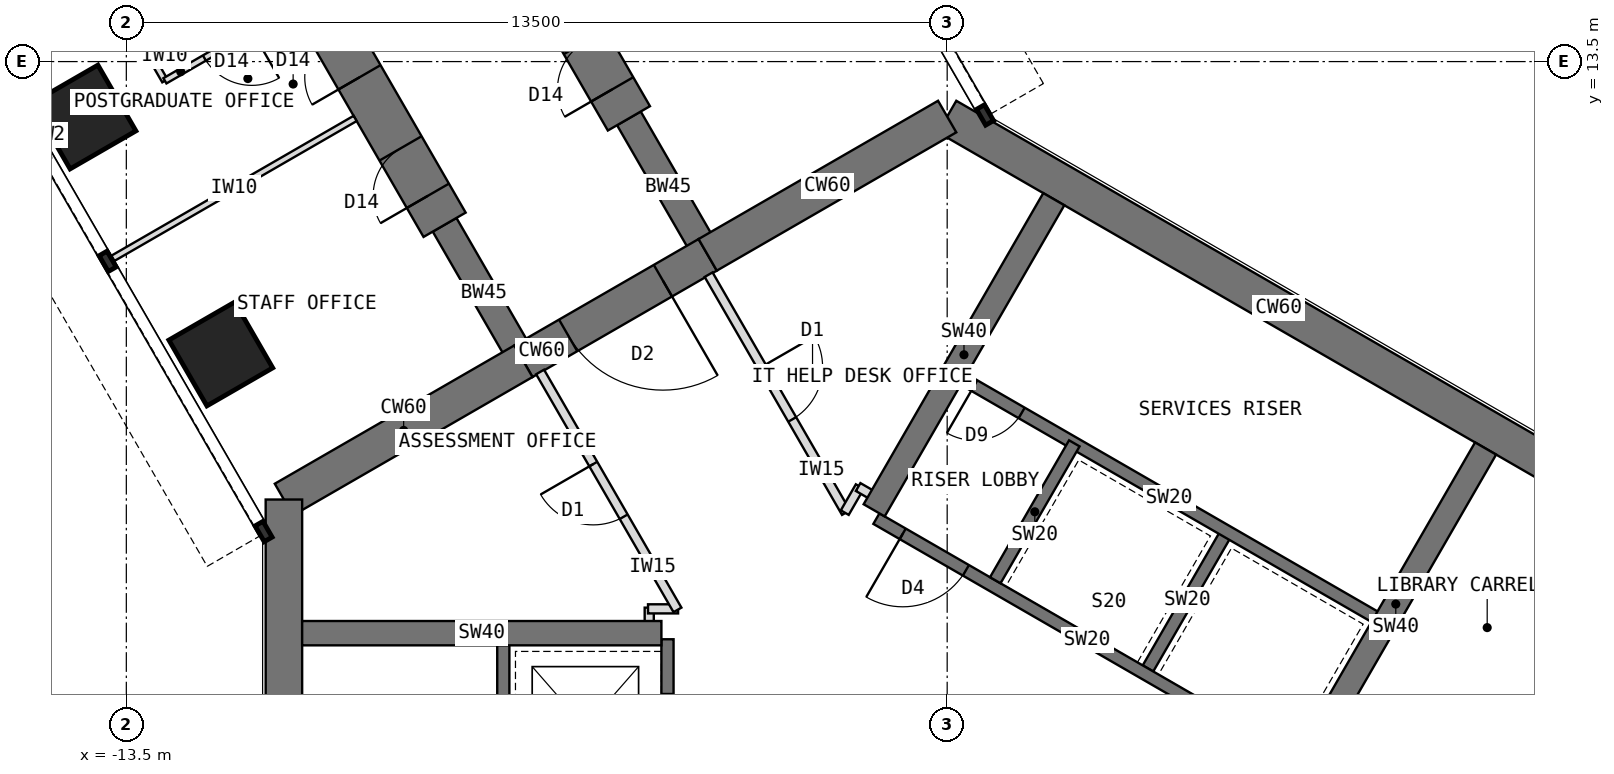
"""IFC4 building model, lengths in metres.
Left out: names, types, materials, properties, quantities, classifications, styles, units other than length and angle.
Written with IfcOpenShell. Run it as: python <this file> out.ifc"""

import sys

from ifc_helpers import new_model, si_unit, direction, frame, frame_2d, origin, origin_2d, place, context, subcontext, project, spatial, rectangle, extrude, element, fill, save


model = new_model("IFC4")
c1 = context("Model", 3, precision=1e-05, world=origin(), true_north=direction((0.0, 1.0)))
c2 = subcontext(c1, "Body", "Model", "MODEL_VIEW")
j1 = project(units=[si_unit("LENGTHUNIT", "METRE"), si_unit("PLANEANGLEUNIT", "RADIAN")], contexts=[c1])
p1 = place(None, origin())
s1 = spatial("IfcSite", under=j1, at=p1, CompositionType="ELEMENT")
p2 = place(p1, origin())
s2 = spatial("IfcBuilding", under=s1, at=p2, CompositionType="ELEMENT")
p3 = place(p2, frame((0.0, 0.0, 145.5)))
s3 = spatial("IfcBuildingStorey", under=s2, at=p3, CompositionType="ELEMENT", Elevation=145.5)
p4 = place(p3, frame((10.908, 6.298, 0.0), z_axis=(0.0, 0.0, 1.0), x_axis=(-0.866021940709, 0.500005998175, 0.0)))
e1 = element("IfcWall", 1, at=p4, inside=s3, PredefinedType="SHEAR", context=c2, shape_type="SweptSolid", body=[
    extrude(rectangle(XDim=12.596, YDim=0.6, at=frame_2d((6.298, 0.0))), origin(), (0.0, 0.0, 1.0), 4.0),
])
p5 = place(p3, frame((0.0, 12.596, 0.0), z_axis=(0.0, 0.0, 1.0), x_axis=(-0.866011268655, -0.500024481964, 0.0)))
e2 = element("IfcWall", 2, at=p5, inside=s3, PredefinedType="SHEAR", context=c2, shape_type="SweptSolid", body=[
    extrude(rectangle(XDim=4.548, YDim=0.6, at=frame_2d((2.274, 0.0))), origin(), (0.0, 0.0, 1.0), 4.0),
])
p6 = place(p3, frame((-3.939, 10.322, 0.0), z_axis=(0.0, 0.0, 1.0), x_axis=(-0.866019471182, -0.500010275428, 0.0)))
e3 = element("IfcWall", 3, at=p6, inside=s3, PredefinedType="SHEAR", context=c2, shape_type="SweptSolid", body=[
    extrude(rectangle(XDim=3.5, YDim=0.6, at=frame_2d((1.75, 0.0))), origin(), (0.0, 0.0, 1.0), 4.0),
])
p7 = place(p6, frame((0.85, 0.0, 0.0)))
e4 = element("IfcOpeningElement", 4, at=p7, cuts=e3, PredefinedType="OPENING", context=c2, shape_type="SweptSolid", body=[
    extrude(rectangle(XDim=1.8, YDim=2.1, at=frame_2d((0.9, 1.05))), frame((0.0, 0.31, 0.0), z_axis=(0.0, -1.0, 0.0), x_axis=(1.0, 0.0, 0.0)), (0.0, 0.0, 1.0), 0.62),
])
p8 = place(p3, frame((-6.97, 8.572, 0.0), z_axis=(0.0, 0.0, 1.0), x_axis=(-0.866034513004, -0.499984222037, 0.0)))
e5 = element("IfcWall", 5, at=p8, inside=s3, PredefinedType="SHEAR", context=c2, shape_type="SweptSolid", body=[
    extrude(rectangle(XDim=4.548, YDim=0.6, at=frame_2d((2.274, 0.0))), origin(), (0.0, 0.0, 1.0), 4.0),
])
p9 = place(p3, frame((-10.908, 6.298, 0.0), z_axis=(0.0, 0.0, 1.0), x_axis=(0.0, -1.0, 0.0)))
e6 = element("IfcWall", 6, at=p9, inside=s3, PredefinedType="SHEAR", context=c2, shape_type="SweptSolid", body=[
    extrude(rectangle(XDim=12.596, YDim=0.6, at=frame_2d((6.298, 0.0))), origin(), (0.0, 0.0, 1.0), 4.0),
])
p10 = place(p3, frame((-6.97, 8.572, 0.0), z_axis=(0.0, 0.0, 1.0), x_axis=(-0.499988811324, 0.866031863473, 0.0)))
e7 = element("IfcWall", 7, at=p10, inside=s3, PredefinedType="SHEAR", context=c2, shape_type="SweptSolid", body=[
    extrude(rectangle(XDim=2.592, YDim=0.45, at=frame_2d((1.296, 0.0))), origin(), (0.0, 0.0, 1.0), 4.0),
])
p11 = place(p3, frame((-8.266, 10.816, 0.0), z_axis=(0.0, 0.0, 1.0), x_axis=(-0.499996231654, 0.866027579429, 0.0)))
e8 = element("IfcWall", 8, at=p11, inside=s3, PredefinedType="SHEAR", context=c2, shape_type="SweptSolid", body=[
    extrude(rectangle(XDim=13.2, YDim=0.8, at=frame_2d((6.6, 0.0))), origin(), (0.0, 0.0, 1.0), 4.0),
])
p12 = place(p11, frame((0.55, 0.0, 0.0)))
e9 = element("IfcOpeningElement", 9, at=p12, cuts=e8, PredefinedType="OPENING", context=c2, shape_type="SweptSolid", body=[
    extrude(rectangle(XDim=0.9, YDim=2.1, at=frame_2d((0.45, 1.05))), frame((0.0, 0.41, 0.0), z_axis=(0.0, -1.0, 0.0), x_axis=(1.0, 0.0, 0.0)), (0.0, 0.0, 1.0), 0.82),
])
p13 = place(p11, frame((2.8, 0.0, 0.0)))
e10 = element("IfcOpeningElement", 10, at=p13, cuts=e8, PredefinedType="OPENING", context=c2, shape_type="SweptSolid", body=[
    extrude(rectangle(XDim=0.9, YDim=2.1, at=frame_2d((0.45, 1.05))), frame((0.0, 0.41, 0.0), z_axis=(0.0, -1.0, 0.0), x_axis=(1.0, 0.0, 0.0)), (0.0, 0.0, 1.0), 0.82),
])
p14 = place(p11, frame((7.3, 0.0, 0.0)))
e11 = element("IfcOpeningElement", 11, at=p14, cuts=e8, PredefinedType="OPENING", context=c2, shape_type="SweptSolid", body=[
    extrude(rectangle(XDim=0.9, YDim=2.1, at=frame_2d((0.45, 1.05))), frame((0.0, 0.41, 0.0), z_axis=(0.0, -1.0, 0.0), x_axis=(1.0, 0.0, 0.0)), (0.0, 0.0, 1.0), 0.82),
])
p15 = place(p3, frame((-3.939, 10.322, 0.0), z_axis=(0.0, 0.0, 1.0), x_axis=(-0.499918158782, 0.866072649678, 0.0)))
e12 = element("IfcWall", 12, at=p15, inside=s3, PredefinedType="SHEAR", context=c2, shape_type="SweptSolid", body=[
    extrude(rectangle(XDim=2.592, YDim=0.45, at=frame_2d((1.296, 0.0))), origin(), (0.0, 0.0, 1.0), 4.0),
])
p16 = place(p3, frame((-5.234, 12.566, 0.0), z_axis=(0.0, 0.0, 1.0), x_axis=(-0.500010103361, 0.866019570528, 0.0)))
e13 = element("IfcWall", 13, at=p16, inside=s3, PredefinedType="SHEAR", context=c2, shape_type="SweptSolid", body=[
    extrude(rectangle(XDim=13.2, YDim=0.8, at=frame_2d((6.6, 0.0))), origin(), (0.0, 0.0, 1.0), 4.0),
])
p17 = place(p16, frame((0.55, 0.0, 0.0)))
e14 = element("IfcOpeningElement", 14, at=p17, cuts=e13, PredefinedType="OPENING", context=c2, shape_type="SweptSolid", body=[
    extrude(rectangle(XDim=0.9, YDim=2.1, at=frame_2d((0.45, 1.05))), frame((0.0, 0.41, 0.0), z_axis=(0.0, -1.0, 0.0), x_axis=(1.0, 0.0, 0.0)), (0.0, 0.0, 1.0), 0.82),
])
p18 = place(p16, frame((2.8, 0.0, 0.0)))
e15 = element("IfcOpeningElement", 15, at=p18, cuts=e13, PredefinedType="OPENING", context=c2, shape_type="SweptSolid", body=[
    extrude(rectangle(XDim=0.9, YDim=2.1, at=frame_2d((0.45, 1.05))), frame((0.0, 0.41, 0.0), z_axis=(0.0, -1.0, 0.0), x_axis=(1.0, 0.0, 0.0)), (0.0, 0.0, 1.0), 0.82),
])
p19 = place(p16, frame((7.3, 0.0, 0.0)))
e16 = element("IfcOpeningElement", 16, at=p19, cuts=e13, PredefinedType="OPENING", context=c2, shape_type="SweptSolid", body=[
    extrude(rectangle(XDim=0.9, YDim=2.1, at=frame_2d((0.45, 1.05))), frame((0.0, 0.41, 0.0), z_axis=(0.0, -1.0, 0.0), x_axis=(1.0, 0.0, 0.0)), (0.0, 0.0, 1.0), 0.82),
])
for number, where, z_axis, x_axis in (
    (17, (-11.946, 8.691, 0.0), (0.0, 0.0, 1.0), (0.866, 0.5, 0.0)),
    (18, (-14.196, 12.588, 0.0), (0.0, 0.0, 1.0), (0.866, 0.5, 0.0)),
):
    element("IfcColumn", number, at=place(p3, frame(where, z_axis=z_axis, x_axis=x_axis)), inside=s3, PredefinedType="COLUMN", context=c2, shape_type="SweptSolid", body=[
        extrude(rectangle(XDim=1.25, YDim=1.25, at=origin_2d()), origin(), (0.0, 0.0, 1.0), 4.0),
    ])
p20 = place(p3, frame((5.764, 1.984, 0.0), z_axis=(0.0, 0.0, 1.0), x_axis=(-0.866026010844, 0.49999894854, 0.0)))
e19 = element("IfcWall", 19, at=p20, inside=s3, PredefinedType="SHEAR", context=c2, shape_type="SweptSolid", body=[
    extrude(rectangle(XDim=8.0, YDim=0.2, at=frame_2d((4.0, 0.0))), origin(), (0.0, 0.0, 1.0), 4.0),
])
p21 = place(p20, frame((6.3, 0.0, 0.0)))
e20 = element("IfcOpeningElement", 20, at=p21, cuts=e19, PredefinedType="OPENING", context=c2, shape_type="SweptSolid", body=[
    extrude(rectangle(XDim=1.2, YDim=2.1, at=frame_2d((0.6, 1.05))), frame((0.0, 0.11, 0.0), z_axis=(0.0, -1.0, 0.0), x_axis=(1.0, 0.0, 0.0)), (0.0, 0.0, 1.0), 0.22),
])
for number, where, z_axis, x_axis in (
    (21, (3.303, 3.52, 0.0), (0.0, 0.0, 1.0), (0.5, 0.866, 0.0)),
    (22, (0.791, 4.97, 0.0), (0.0, 0.0, 1.0), (0.5, 0.866, 0.0)),
):
    element("IfcWall", number, at=place(p3, frame(where, z_axis=z_axis, x_axis=x_axis)), inside=s3, PredefinedType="SHEAR", context=c2, shape_type="SweptSolid", body=[
        extrude(rectangle(XDim=2.6, YDim=0.2, at=frame_2d((1.3, 0.0))), origin(), (0.0, 0.0, 1.0), 4.0),
    ])
p22 = place(p3, frame((7.114, 4.322, 0.0), z_axis=(0.0, 0.0, 1.0), x_axis=(-0.866026010844, 0.49999894854, 0.0)))
e23 = element("IfcWall", 23, at=p22, inside=s3, PredefinedType="SHEAR", context=c2, shape_type="SweptSolid", body=[
    extrude(rectangle(XDim=8.0, YDim=0.2, at=frame_2d((4.0, 0.0))), origin(), (0.0, 0.0, 1.0), 4.0),
])
p23 = place(p22, frame((6.8, 0.0, 0.0)))
e24 = element("IfcOpeningElement", 24, at=p23, cuts=e23, PredefinedType="OPENING", context=c2, shape_type="SweptSolid", body=[
    extrude(rectangle(XDim=0.9, YDim=2.1, at=frame_2d((0.45, 1.05))), frame((0.0, 0.11, 0.0), z_axis=(0.0, -1.0, 0.0), x_axis=(1.0, 0.0, 0.0)), (0.0, 0.0, 1.0), 0.22),
])
p24 = place(p3, frame((-1.201, 6.12, 0.0), z_axis=(0.0, 0.0, 1.0), x_axis=(0.49999668571, 0.866027317282, 0.0)))
e25 = element("IfcWall", 25, at=p24, inside=s3, PredefinedType="SHEAR", context=c2, shape_type="SweptSolid", body=[
    extrude(rectangle(XDim=5.908, YDim=0.4, at=frame_2d((2.954, 0.0))), origin(), (0.0, 0.0, 1.0), 4.0),
])
p25 = place(p3, frame((5.901, 2.02, 0.0), z_axis=(0.0, 0.0, 1.0), x_axis=(0.500027676417, 0.866009424208, 0.0)))
e26 = element("IfcWall", 26, at=p25, inside=s3, PredefinedType="SHEAR", context=c2, shape_type="SweptSolid", body=[
    extrude(rectangle(XDim=5.908, YDim=0.4, at=frame_2d((2.954, 0.0))), origin(), (0.0, 0.0, 1.0), 4.0),
])
p26 = place(p3, frame((-4.6, 4.0, 0.0), z_axis=(0.0, 0.0, 1.0), x_axis=(0.0, -1.0, 0.0)))
e27 = element("IfcWall", 27, at=p26, inside=s3, PredefinedType="SHEAR", context=c2, shape_type="SweptSolid", body=[
    extrude(rectangle(XDim=8.0, YDim=0.2, at=frame_2d((4.0, 0.0))), origin(), (0.0, 0.0, 1.0), 4.0),
])
p27 = place(p26, frame((6.3, 0.0, 0.0)))
e28 = element("IfcOpeningElement", 28, at=p27, cuts=e27, PredefinedType="OPENING", context=c2, shape_type="SweptSolid", body=[
    extrude(rectangle(XDim=1.2, YDim=2.1, at=frame_2d((0.6, 1.05))), frame((0.0, 0.11, 0.0), z_axis=(0.0, -1.0, 0.0), x_axis=(1.0, 0.0, 0.0)), (0.0, 0.0, 1.0), 0.22),
])
p28 = place(p26, frame((0.9, 0.0, 0.0)))
e29 = element("IfcOpeningElement", 29, at=p28, cuts=e27, PredefinedType="OPENING", context=c2, shape_type="SweptSolid", body=[
    extrude(rectangle(XDim=1.1, YDim=2.2, at=frame_2d((0.55, 1.1))), frame((0.0, 0.11, 0.0), z_axis=(0.0, -1.0, 0.0), x_axis=(1.0, 0.0, 0.0)), (0.0, 0.0, 1.0), 0.22),
])
p29 = place(p3, frame((-7.3, 4.0, 0.0), z_axis=(0.0, 0.0, 1.0), x_axis=(0.0, -1.0, 0.0)))
e30 = element("IfcWall", 30, at=p29, inside=s3, PredefinedType="SHEAR", context=c2, shape_type="SweptSolid", body=[
    extrude(rectangle(XDim=8.0, YDim=0.2, at=frame_2d((4.0, 0.0))), origin(), (0.0, 0.0, 1.0), 4.0),
])
p30 = place(p29, frame((6.7, 0.0, 0.0)))
e31 = element("IfcOpeningElement", 31, at=p30, cuts=e30, PredefinedType="OPENING", context=c2, shape_type="SweptSolid", body=[
    extrude(rectangle(XDim=1.1, YDim=2.1, at=frame_2d((0.55, 1.05))), frame((0.0, 0.11, 0.0), z_axis=(0.0, -1.0, 0.0), x_axis=(1.0, 0.0, 0.0)), (0.0, 0.0, 1.0), 0.22),
])
p31 = place(p3, frame((-4.7, 4.1, 0.0), z_axis=(0.0, 0.0, 1.0), x_axis=(-1.0, 0.0, 0.0)))
e32 = element("IfcWall", 32, at=p31, inside=s3, PredefinedType="SHEAR", context=c2, shape_type="SweptSolid", body=[
    extrude(rectangle(XDim=5.908, YDim=0.4, at=frame_2d((2.954, 0.0))), origin(), (0.0, 0.0, 1.0), 4.0),
])
p32 = place(p3, frame((-9.737, 12.565, 0.0), z_axis=(0.0, 0.0, 1.0), x_axis=(-0.866016770315, -0.500014953309, 0.0)))
e33 = element("IfcWall", 33, at=p32, inside=s3, PredefinedType="PARTITIONING", context=c2, shape_type="SweptSolid", body=[
    extrude(rectangle(XDim=4.6, YDim=0.1, at=frame_2d((2.3, 0.0))), origin(), (0.0, 0.0, 1.0), 3.8),
])
p33 = place(p3, frame((-12.865, 13.184, 0.0), z_axis=(0.0, 0.0, 1.0), x_axis=(-0.500001309137, 0.866024647952, 0.0)))
e34 = element("IfcWall", 34, at=p33, inside=s3, PredefinedType="PARTITIONING", context=c2, shape_type="SweptSolid", body=[
    extrude(rectangle(XDim=2.4, YDim=0.1, at=frame_2d((1.2, 0.0))), origin(), (0.0, 0.0, 1.0), 3.8),
])
p34 = place(p3, frame((-10.787, 14.384, 0.0), z_axis=(0.0, 0.0, 1.0), x_axis=(-0.866050077142, -0.499957262057, 0.0)))
e35 = element("IfcWall", 35, at=p34, inside=s3, PredefinedType="PARTITIONING", context=c2, shape_type="SweptSolid", body=[
    extrude(rectangle(XDim=2.4, YDim=0.1, at=frame_2d((1.2, 0.0))), origin(), (0.0, 0.0, 1.0), 3.8),
])
p35 = place(p34, frame((0.75, 0.0, 0.0)))
e36 = element("IfcOpeningElement", 36, at=p35, cuts=e35, PredefinedType="OPENING", context=c2, shape_type="SweptSolid", body=[
    extrude(rectangle(XDim=0.9, YDim=2.1, at=frame_2d((0.45, 1.05))), frame((0.0, 0.06, 0.0), z_axis=(0.0, -1.0, 0.0), x_axis=(1.0, 0.0, 0.0)), (0.0, 0.0, 1.0), 0.12),
])
p36 = place(p3, frame((-4.9, 4.09, 0.0), z_axis=(0.0, 0.0, 1.0), x_axis=(0.0, 1.0, 0.0)))
e37 = element("IfcWall", 37, at=p36, inside=s3, PredefinedType="PARTITIONING", context=c2, shape_type="SweptSolid", body=[
    extrude(rectangle(XDim=0.43, YDim=0.15, at=frame_2d((0.215, 0.0))), origin(), (0.0, 0.0, 1.0), 3.8),
])
p37 = place(p3, frame((-4.92, 4.5, 0.0), z_axis=(0.0, 0.0, 1.0), x_axis=(1.0, 0.0, 0.0)))
e38 = element("IfcWall", 38, at=p37, inside=s3, PredefinedType="PARTITIONING", context=c2, shape_type="SweptSolid", body=[
    extrude(rectangle(XDim=0.494, YDim=0.15, at=frame_2d((0.247, 0.0))), origin(), (0.0, 0.0, 1.0), 3.8),
])
p38 = place(p3, frame((-4.436, 4.483, 0.0), z_axis=(0.0, 0.0, 1.0), x_axis=(-0.500009315796, 0.86602002524, 0.0)))
e39 = element("IfcWall", 39, at=p38, inside=s3, PredefinedType="PARTITIONING", context=c2, shape_type="SweptSolid", body=[
    extrude(rectangle(XDim=4.519, YDim=0.15, at=frame_2d((2.259, 0.0))), origin(), (0.0, 0.0, 1.0), 3.8),
])
p39 = place(p38, frame((1.769, 0.0, 0.0)))
e40 = element("IfcOpeningElement", 40, at=p39, cuts=e39, PredefinedType="OPENING", context=c2, shape_type="SweptSolid", body=[
    extrude(rectangle(XDim=1.0, YDim=2.1, at=frame_2d((0.5, 1.05))), frame((0.0, 0.085, 0.0), z_axis=(0.0, -1.0, 0.0), x_axis=(1.0, 0.0, 0.0)), (0.0, 0.0, 1.0), 0.17),
])
p40 = place(p3, frame((-3.924, 9.996, 0.0), z_axis=(0.0, 0.0, 1.0), x_axis=(0.500032713409, -0.866006515865, 0.0)))
e41 = element("IfcWall", 41, at=p40, inside=s3, PredefinedType="PARTITIONING", context=c2, shape_type="SweptSolid", body=[
    extrude(rectangle(XDim=4.518, YDim=0.15, at=frame_2d((2.259, 0.0))), origin(), (0.0, 0.0, 1.0), 3.8),
])
p41 = place(p40, frame((1.749, 0.0, 0.0)))
e42 = element("IfcOpeningElement", 42, at=p41, cuts=e41, PredefinedType="OPENING", context=c2, shape_type="SweptSolid", body=[
    extrude(rectangle(XDim=1.0, YDim=2.1, at=frame_2d((0.5, 1.05))), frame((0.0, 0.085, 0.0), z_axis=(0.0, -1.0, 0.0), x_axis=(1.0, 0.0, 0.0)), (0.0, 0.0, 1.0), 0.17),
])
p42 = place(p3, frame((-1.684, 6.083, 0.0), z_axis=(0.0, 0.0, 1.0), x_axis=(0.50033519877, 0.865831790172, 0.0)))
e43 = element("IfcWall", 43, at=p42, inside=s3, PredefinedType="PARTITIONING", context=c2, shape_type="SweptSolid", body=[
    extrude(rectangle(XDim=0.494, YDim=0.15, at=frame_2d((0.247, 0.0))), origin(), (0.0, 0.0, 1.0), 3.8),
])
p43 = place(p3, frame((-1.464, 6.503, 0.0), z_axis=(0.0, 0.0, 1.0), x_axis=(0.866138304741, -0.499804398801, 0.0)))
e44 = element("IfcWall", 44, at=p43, inside=s3, PredefinedType="PARTITIONING", context=c2, shape_type="SweptSolid", body=[
    extrude(rectangle(XDim=0.43, YDim=0.15, at=frame_2d((0.215, 0.0))), origin(), (0.0, 0.0, 1.0), 3.8),
])
p44 = place(p21, origin())
e45 = element("IfcDoor", 45, at=p44, inside=s3, OperationType="SINGLE_SWING_RIGHT", PredefinedType="DOOR", context=c2, shape_type="SweptSolid", body=[
    extrude(rectangle(XDim=1.2, YDim=2.1, at=frame_2d((0.6, 1.05))), frame((0.0, 0.025, 0.0), z_axis=(0.0, -1.0, 0.0), x_axis=(1.0, 0.0, 0.0)), (0.0, 0.0, 1.0), 0.05),
])
fill(e20, e45)
p45 = place(p23, origin())
e46 = element("IfcDoor", 46, at=p45, inside=s3, OperationType="SINGLE_SWING_RIGHT", PredefinedType="DOOR", context=c2, shape_type="SweptSolid", body=[
    extrude(rectangle(XDim=0.9, YDim=2.1, at=frame_2d((0.45, 1.05))), frame((0.0, 0.025, 0.0), z_axis=(0.0, -1.0, 0.0), x_axis=(1.0, 0.0, 0.0)), (0.0, 0.0, 1.0), 0.05),
])
fill(e24, e46)
p46 = place(p7, origin())
e47 = element("IfcDoor", 47, at=p46, inside=s3, OperationType="DOUBLE_DOOR_DOUBLE_SWING", PredefinedType="DOOR", context=c2, shape_type="SweptSolid", body=[
    extrude(rectangle(XDim=1.72, YDim=2.06, at=frame_2d((0.9, 1.03))), frame((0.0, 0.025, 0.0), z_axis=(0.0, -1.0, 0.0), x_axis=(1.0, 0.0, 0.0)), (0.0, 0.0, 1.0), 0.05),
    extrude(rectangle(XDim=0.04, YDim=2.1, at=frame_2d((0.02, 1.05))), frame((0.0, 0.3, 0.0), z_axis=(0.0, -1.0, 0.0), x_axis=(1.0, 0.0, 0.0)), (0.0, 0.0, 1.0), 0.6),
    extrude(rectangle(XDim=0.04, YDim=2.1, at=frame_2d((1.78, 1.05))), frame((0.0, 0.3, 0.0), z_axis=(0.0, -1.0, 0.0), x_axis=(1.0, 0.0, 0.0)), (0.0, 0.0, 1.0), 0.6),
    extrude(rectangle(XDim=1.72, YDim=0.04, at=frame_2d((0.9, 2.08))), frame((0.0, 0.3, 0.0), z_axis=(0.0, -1.0, 0.0), x_axis=(1.0, 0.0, 0.0)), (0.0, 0.0, 1.0), 0.6),
])
fill(e4, e47)
p47 = place(p35, origin())
e48 = element("IfcDoor", 48, at=p47, inside=s3, OperationType="SINGLE_SWING_LEFT", PredefinedType="DOOR", context=c2, shape_type="SweptSolid", body=[
    extrude(rectangle(XDim=0.9, YDim=2.1, at=frame_2d((0.45, 1.05))), frame((0.0, 0.025, 0.0), z_axis=(0.0, -1.0, 0.0), x_axis=(1.0, 0.0, 0.0)), (0.0, 0.0, 1.0), 0.05),
])
fill(e36, e48)
p48 = place(p41, origin())
e49 = element("IfcDoor", 49, at=p48, inside=s3, OperationType="SINGLE_SWING_LEFT", PredefinedType="DOOR", context=c2, shape_type="SweptSolid", body=[
    extrude(rectangle(XDim=1.0, YDim=2.1, at=frame_2d((0.5, 1.05))), frame((0.0, 0.025, 0.0), z_axis=(0.0, -1.0, 0.0), x_axis=(1.0, 0.0, 0.0)), (0.0, 0.0, 1.0), 0.05),
])
fill(e42, e49)
p49 = place(p39, origin())
e50 = element("IfcDoor", 50, at=p49, inside=s3, OperationType="SINGLE_SWING_RIGHT", PredefinedType="DOOR", context=c2, shape_type="SweptSolid", body=[
    extrude(rectangle(XDim=1.0, YDim=2.1, at=frame_2d((0.5, 1.05))), frame((0.0, 0.025, 0.0), z_axis=(0.0, -1.0, 0.0), x_axis=(1.0, 0.0, 0.0)), (0.0, 0.0, 1.0), 0.05),
])
fill(e40, e50)
p50 = place(p12, origin())
e51 = element("IfcDoor", 51, at=p50, inside=s3, OperationType="SINGLE_SWING_LEFT", PredefinedType="DOOR", context=c2, shape_type="SweptSolid", body=[
    extrude(rectangle(XDim=0.82, YDim=2.06, at=frame_2d((0.45, 1.03))), frame((0.0, 0.025, 0.0), z_axis=(0.0, -1.0, 0.0), x_axis=(1.0, 0.0, 0.0)), (0.0, 0.0, 1.0), 0.05),
    extrude(rectangle(XDim=0.04, YDim=2.1, at=frame_2d((0.02, 1.05))), frame((0.0, 0.4, 0.0), z_axis=(0.0, -1.0, 0.0), x_axis=(1.0, 0.0, 0.0)), (0.0, 0.0, 1.0), 0.8),
    extrude(rectangle(XDim=0.04, YDim=2.1, at=frame_2d((0.88, 1.05))), frame((0.0, 0.4, 0.0), z_axis=(0.0, -1.0, 0.0), x_axis=(1.0, 0.0, 0.0)), (0.0, 0.0, 1.0), 0.8),
    extrude(rectangle(XDim=0.82, YDim=0.04, at=frame_2d((0.45, 2.08))), frame((0.0, 0.4, 0.0), z_axis=(0.0, -1.0, 0.0), x_axis=(1.0, 0.0, 0.0)), (0.0, 0.0, 1.0), 0.8),
])
fill(e9, e51)
p51 = place(p13, origin())
e52 = element("IfcDoor", 52, at=p51, inside=s3, OperationType="SINGLE_SWING_LEFT", PredefinedType="DOOR", context=c2, shape_type="SweptSolid", body=[
    extrude(rectangle(XDim=0.82, YDim=2.06, at=frame_2d((0.45, 1.03))), frame((0.0, 0.025, 0.0), z_axis=(0.0, -1.0, 0.0), x_axis=(1.0, 0.0, 0.0)), (0.0, 0.0, 1.0), 0.05),
    extrude(rectangle(XDim=0.04, YDim=2.1, at=frame_2d((0.02, 1.05))), frame((0.0, 0.4, 0.0), z_axis=(0.0, -1.0, 0.0), x_axis=(1.0, 0.0, 0.0)), (0.0, 0.0, 1.0), 0.8),
    extrude(rectangle(XDim=0.04, YDim=2.1, at=frame_2d((0.88, 1.05))), frame((0.0, 0.4, 0.0), z_axis=(0.0, -1.0, 0.0), x_axis=(1.0, 0.0, 0.0)), (0.0, 0.0, 1.0), 0.8),
    extrude(rectangle(XDim=0.82, YDim=0.04, at=frame_2d((0.45, 2.08))), frame((0.0, 0.4, 0.0), z_axis=(0.0, -1.0, 0.0), x_axis=(1.0, 0.0, 0.0)), (0.0, 0.0, 1.0), 0.8),
])
fill(e10, e52)
p52 = place(p17, origin())
e53 = element("IfcDoor", 53, at=p52, inside=s3, OperationType="SINGLE_SWING_LEFT", PredefinedType="DOOR", context=c2, shape_type="SweptSolid", body=[
    extrude(rectangle(XDim=0.82, YDim=2.06, at=frame_2d((0.45, 1.03))), frame((0.0, 0.025, 0.0), z_axis=(0.0, -1.0, 0.0), x_axis=(1.0, 0.0, 0.0)), (0.0, 0.0, 1.0), 0.05),
    extrude(rectangle(XDim=0.04, YDim=2.1, at=frame_2d((0.02, 1.05))), frame((0.0, 0.4, 0.0), z_axis=(0.0, -1.0, 0.0), x_axis=(1.0, 0.0, 0.0)), (0.0, 0.0, 1.0), 0.8),
    extrude(rectangle(XDim=0.04, YDim=2.1, at=frame_2d((0.88, 1.05))), frame((0.0, 0.4, 0.0), z_axis=(0.0, -1.0, 0.0), x_axis=(1.0, 0.0, 0.0)), (0.0, 0.0, 1.0), 0.8),
    extrude(rectangle(XDim=0.82, YDim=0.04, at=frame_2d((0.45, 2.08))), frame((0.0, 0.4, 0.0), z_axis=(0.0, -1.0, 0.0), x_axis=(1.0, 0.0, 0.0)), (0.0, 0.0, 1.0), 0.8),
])
fill(e14, e53)
save(model, sys.argv[1])
